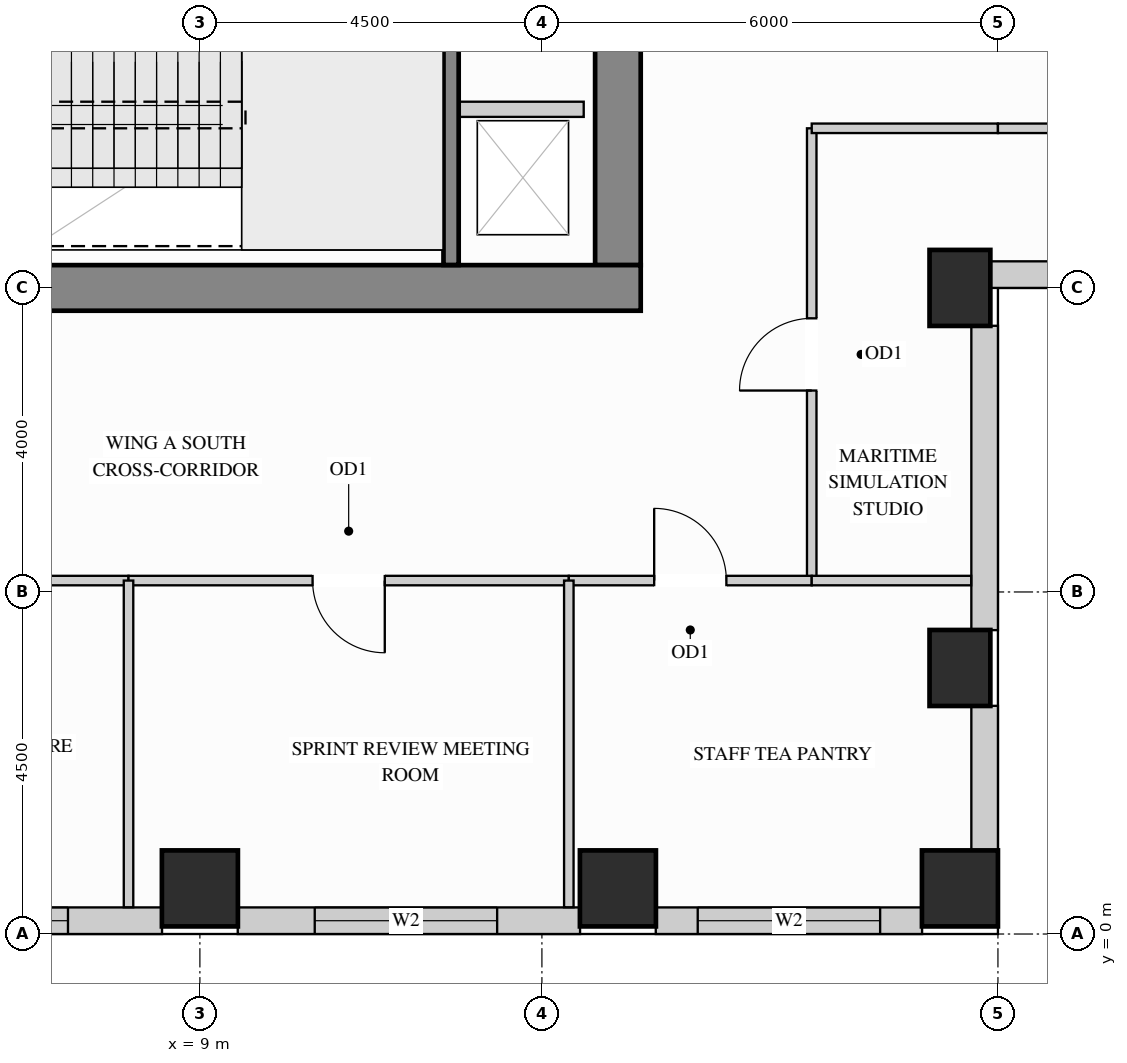
"""IFC4 building model, lengths in metres.
Left out: names, types, materials, properties, quantities, classifications, styles, units other than length and angle.
Written with IfcOpenShell. Run it as: python <this file> out.ifc"""

import sys

from ifc_helpers import new_model, si_unit, direction, frame, frame_2d, origin, origin_2d, place, context, subcontext, project, spatial, rectangle, extrude, source, transform, mapped, element, fill, save


model = new_model("IFC4")
c1 = context("Model", 3, precision=1e-05, world=origin(), true_north=direction((0.0, 1.0)))
c2 = subcontext(c1, "Body", "Model", "MODEL_VIEW")
j1 = project(units=[si_unit("LENGTHUNIT", "METRE"), si_unit("PLANEANGLEUNIT", "RADIAN")], contexts=[c1])
p1 = place(None, origin())
s1 = spatial("IfcSite", under=j1, at=p1, CompositionType="ELEMENT")
p2 = place(p1, origin())
s2 = spatial("IfcBuilding", under=s1, at=p2, CompositionType="ELEMENT")
p3 = place(p2, frame((0.0, 0.0, 193.5)))
s3 = spatial("IfcBuildingStorey", under=s2, at=p3, CompositionType="ELEMENT", Elevation=193.5)
m1 = source(origin(), c2, "Body", "SweptSolid", [
    extrude(rectangle(XDim=0.8, YDim=1.0, at=origin_2d()), origin(), (0.0, 0.0, 1.0), 3.4),
])
for number, where, z_axis, x_axis in (
    (1, (19.0, 3.5, 0.0), (0.0, 0.0, 1.0), (1.0, 0.0, 0.0)),
    (2, (19.0, 8.5, 0.0), (0.0, 0.0, 1.0), (1.0, 0.0, 0.0)),
):
    element("IfcColumn", number, at=place(p3, frame(where, z_axis=z_axis, x_axis=x_axis)), inside=s3, PredefinedType="COLUMN", context=c2, shape_type="MappedRepresentation", body=[
        mapped(m1, transform((0.0, 0.0, 0.0), x_axis=(1.0, 0.0, 0.0), y_axis=(0.0, 1.0, 0.0), z_axis=(0.0, 0.0, 1.0))),
    ])
m2 = source(origin(), c2, "Body", "SweptSolid", [
    extrude(rectangle(XDim=1.0, YDim=1.0, at=origin_2d()), origin(), (0.0, 0.0, 1.0), 3.4),
])
for number, where, z_axis, x_axis in (
    (3, (14.5, 0.6, 0.0), (0.0, 0.0, 1.0), (1.0, 0.0, 0.0)),
    (4, (19.0, 0.6, 0.0), (0.0, 0.0, 1.0), (1.0, 0.0, 0.0)),
    (5, (9.0, 0.6, 0.0), (0.0, 0.0, 1.0), (1.0, 0.0, 0.0)),
):
    element("IfcColumn", number, at=place(p3, frame(where, z_axis=z_axis, x_axis=x_axis)), inside=s3, PredefinedType="COLUMN", context=c2, shape_type="MappedRepresentation", body=[
        mapped(m2, transform((0.0, 0.0, 0.0), x_axis=(1.0, 0.0, 0.0), y_axis=(0.0, 1.0, 0.0), z_axis=(0.0, 0.0, 1.0))),
    ])
m3 = source(origin(), c2, "Body", "SweptSolid", [
    extrude(rectangle(XDim=10.02, YDim=0.6, at=frame_2d((5.01, 0.0))), origin(), (0.0, 0.0, 1.0), 3.4),
])
p4 = place(p3, frame((14.5, 8.8, 0.0), z_axis=(0.0, 0.0, 1.0), x_axis=(0.0, 1.0, 0.0)))
e6 = element("IfcWall", 6, at=p4, inside=s3, PredefinedType="SHEAR", context=c2, shape_type="MappedRepresentation", body=[
    mapped(m3, transform((0.0, 0.0, 0.0), x_axis=(1.0, 0.0, 0.0), y_axis=(0.0, 1.0, 0.0), z_axis=(0.0, 0.0, 1.0))),
])
m4 = source(origin(), c2, "Body", "SweptSolid", [
    extrude(rectangle(XDim=10.6, YDim=0.6, at=frame_2d((5.3, 0.0))), origin(), (0.0, 0.0, 1.0), 3.4),
])
p5 = place(p3, frame((4.2, 8.5, 0.0), z_axis=(0.0, 0.0, 1.0), x_axis=(1.0, 0.0, 0.0)))
e7 = element("IfcWall", 7, at=p5, inside=s3, PredefinedType="SHEAR", context=c2, shape_type="MappedRepresentation", body=[
    mapped(m4, transform((0.0, 0.0, 0.0), x_axis=(1.0, 0.0, 0.0), y_axis=(0.0, 1.0, 0.0), z_axis=(0.0, 0.0, 1.0))),
])
p6 = place(p3, frame((3.998, 0.175, 0.0), z_axis=(0.0, 0.0, 1.0), x_axis=(1.0, 0.0, 0.0)))
e8 = element("IfcWall", 8, at=p6, inside=s3, PredefinedType="SOLIDWALL", context=c2, shape_type="SweptSolid", body=[
    extrude(rectangle(XDim=4.504, YDim=0.35, at=frame_2d((2.252, 0.0))), origin(), (0.0, 0.0, 1.0), 2.612),
])
p7 = place(p6, frame((0.866, 0.0, 0.78)))
e9 = element("IfcOpeningElement", 9, at=p7, cuts=e8, PredefinedType="OPENING", context=c2, shape_type="SweptSolid", body=[
    extrude(rectangle(XDim=2.4, YDim=1.652, at=frame_2d((1.2, 0.826))), frame((0.0, 0.185, 0.0), z_axis=(0.0, -1.0, 0.0), x_axis=(1.0, 0.0, 0.0)), (0.0, 0.0, 1.0), 0.37),
])
p8 = place(p3, frame((9.498, 0.175, 0.0), z_axis=(0.0, 0.0, 1.0), x_axis=(1.0, 0.0, 0.0)))
e10 = element("IfcWall", 10, at=p8, inside=s3, PredefinedType="SOLIDWALL", context=c2, shape_type="SweptSolid", body=[
    extrude(rectangle(XDim=4.504, YDim=0.35, at=frame_2d((2.252, 0.0))), origin(), (0.0, 0.0, 1.0), 2.612),
])
p9 = place(p8, frame((1.013, 0.0, 0.78)))
e11 = element("IfcOpeningElement", 11, at=p9, cuts=e10, PredefinedType="OPENING", context=c2, shape_type="SweptSolid", body=[
    extrude(rectangle(XDim=2.4, YDim=1.652, at=frame_2d((1.2, 0.826))), frame((0.0, 0.185, 0.0), z_axis=(0.0, -1.0, 0.0), x_axis=(1.0, 0.0, 0.0)), (0.0, 0.0, 1.0), 0.37),
])
p10 = place(p3, frame((14.998, 0.175, 0.0), z_axis=(0.0, 0.0, 1.0), x_axis=(1.0, 0.0, 0.0)))
e12 = element("IfcWall", 12, at=p10, inside=s3, PredefinedType="SOLIDWALL", context=c2, shape_type="SweptSolid", body=[
    extrude(rectangle(XDim=3.504, YDim=0.35, at=frame_2d((1.752, 0.0))), origin(), (0.0, 0.0, 1.0), 2.612),
])
p11 = place(p10, frame((0.552, 0.0, 0.78)))
e13 = element("IfcOpeningElement", 13, at=p11, cuts=e12, PredefinedType="OPENING", context=c2, shape_type="SweptSolid", body=[
    extrude(rectangle(XDim=2.4, YDim=1.652, at=frame_2d((1.2, 0.826))), frame((0.0, 0.185, 0.0), z_axis=(0.0, -1.0, 0.0), x_axis=(1.0, 0.0, 0.0)), (0.0, 0.0, 1.0), 0.37),
])
m5 = source(origin(), c2, "Body", "SweptSolid", [
    extrude(rectangle(XDim=1.904, YDim=0.35, at=frame_2d((0.952, 0.0))), origin(), (0.0, 0.0, 1.0), 2.612),
])
p12 = place(p3, frame((19.325, 1.098, 0.0), z_axis=(0.0, 0.0, 1.0), x_axis=(0.0, 1.0, 0.0)))
e14 = element("IfcWall", 14, at=p12, inside=s3, PredefinedType="SOLIDWALL", context=c2, shape_type="MappedRepresentation", body=[
    mapped(m5, transform((0.0, 0.0, 0.0), x_axis=(1.0, 0.0, 0.0), y_axis=(0.0, 1.0, 0.0), z_axis=(0.0, 0.0, 1.0))),
])
m6 = source(origin(), c2, "Body", "SweptSolid", [
    extrude(rectangle(XDim=4.004, YDim=0.35, at=frame_2d((2.002, 0.0))), origin(), (0.0, 0.0, 1.0), 2.612),
])
p13 = place(p3, frame((19.325, 3.998, 0.0), z_axis=(0.0, 0.0, 1.0), x_axis=(0.0, 1.0, 0.0)))
e15 = element("IfcWall", 15, at=p13, inside=s3, PredefinedType="SOLIDWALL", context=c2, shape_type="MappedRepresentation", body=[
    mapped(m6, transform((0.0, 0.0, 0.0), x_axis=(1.0, 0.0, 0.0), y_axis=(0.0, 1.0, 0.0), z_axis=(0.0, 0.0, 1.0))),
])
p14 = place(p3, frame((19.398, 8.675, 0.0), z_axis=(0.0, 0.0, 1.0), x_axis=(1.0, 0.0, 0.0)))
e16 = element("IfcWall", 16, at=p14, inside=s3, PredefinedType="SOLIDWALL", context=c2, shape_type="SweptSolid", body=[
    extrude(rectangle(XDim=3.604, YDim=0.35, at=frame_2d((1.802, 0.0))), origin(), (0.0, 0.0, 1.0), 3.385),
])
p15 = place(p14, frame((1.067, 0.0, 0.78)))
e17 = element("IfcOpeningElement", 17, at=p15, cuts=e16, PredefinedType="OPENING", context=c2, shape_type="SweptSolid", body=[
    extrude(rectangle(XDim=1.5, YDim=2.0, at=frame_2d((0.75, 1.0))), frame((0.0, 0.185, 0.0), z_axis=(0.0, -1.0, 0.0), x_axis=(1.0, 0.0, 0.0)), (0.0, 0.0, 1.0), 0.37),
])
p16 = place(p3, frame((17.05, 4.65, 0.0), z_axis=(0.0, 0.0, 1.0), x_axis=(0.0, 1.0, 0.0)))
e18 = element("IfcWall", 18, at=p16, inside=s3, PredefinedType="PARTITIONING", context=c2, shape_type="SweptSolid", body=[
    extrude(rectangle(XDim=5.95, YDim=0.125, at=frame_2d((2.975, 0.0))), origin(), (0.0, 0.0, 1.0), 3.385),
])
p17 = place(p16, frame((2.5, 0.0, 0.0)))
e19 = element("IfcOpeningElement", 19, at=p17, cuts=e18, PredefinedType="OPENING", context=c2, shape_type="SweptSolid", body=[
    extrude(rectangle(XDim=0.95, YDim=2.15, at=frame_2d((0.475, 1.075))), frame((0.0, 0.073, 0.0), z_axis=(0.0, -1.0, 0.0), x_axis=(1.0, 0.0, 0.0)), (0.0, 0.0, 1.0), 0.145),
])
m7 = source(origin(), c2, "Body", "SweptSolid", [
    extrude(rectangle(XDim=2.45, YDim=0.125, at=frame_2d((1.225, 0.0))), origin(), (0.0, 0.0, 1.0), 3.385),
])
p18 = place(p3, frame((17.05, 10.6, 0.0), z_axis=(0.0, 0.0, 1.0), x_axis=(1.0, 0.0, 0.0)))
e20 = element("IfcWall", 20, at=p18, inside=s3, PredefinedType="PARTITIONING", context=c2, shape_type="MappedRepresentation", body=[
    mapped(m7, transform((0.0, 0.0, 0.0), x_axis=(1.0, 0.0, 0.0), y_axis=(0.0, 1.0, 0.0), z_axis=(0.0, 0.0, 1.0))),
])
p19 = place(p3, frame((19.5, 10.6, 0.0), z_axis=(0.0, 0.0, 1.0), x_axis=(1.0, 0.0, 0.0)))
e21 = element("IfcWall", 21, at=p19, inside=s3, PredefinedType="PARTITIONING", context=c2, shape_type="SweptSolid", body=[
    extrude(rectangle(XDim=14.9, YDim=0.125, at=frame_2d((7.45, 0.0))), origin(), (0.0, 0.0, 1.0), 3.385),
])
p20 = place(p19, frame((6.975, 0.0, 0.0)))
e22 = element("IfcOpeningElement", 22, at=p20, cuts=e21, PredefinedType="OPENING", context=c2, shape_type="SweptSolid", body=[
    extrude(rectangle(XDim=0.95, YDim=2.15, at=frame_2d((0.475, 1.075))), frame((0.0, 0.073, 0.0), z_axis=(0.0, -1.0, 0.0), x_axis=(1.0, 0.0, 0.0)), (0.0, 0.0, 1.0), 0.145),
])
p21 = place(p3, frame((2.45, 4.65, 0.0), z_axis=(0.0, 0.0, 1.0), x_axis=(1.0, 0.0, 0.0)))
e23 = element("IfcWall", 23, at=p21, inside=s3, PredefinedType="PARTITIONING", context=c2, shape_type="SweptSolid", body=[
    extrude(rectangle(XDim=5.611, YDim=0.125, at=frame_2d((2.806, 0.0))), origin(), (0.0, 0.0, 1.0), 2.848),
])
p22 = place(p21, frame((2.331, 0.0, 0.0)))
e24 = element("IfcOpeningElement", 24, at=p22, cuts=e23, PredefinedType="OPENING", context=c2, shape_type="SweptSolid", body=[
    extrude(rectangle(XDim=0.95, YDim=2.15, at=frame_2d((0.475, 1.075))), frame((0.0, 0.073, 0.0), z_axis=(0.0, -1.0, 0.0), x_axis=(1.0, 0.0, 0.0)), (0.0, 0.0, 1.0), 0.145),
])
p23 = place(p3, frame((8.061, 4.65, 0.0), z_axis=(0.0, 0.0, 1.0), x_axis=(1.0, 0.0, 0.0)))
e25 = element("IfcWall", 25, at=p23, inside=s3, PredefinedType="PARTITIONING", context=c2, shape_type="SweptSolid", body=[
    extrude(rectangle(XDim=5.793, YDim=0.125, at=frame_2d((2.896, 0.0))), origin(), (0.0, 0.0, 1.0), 2.848),
])
p24 = place(p23, frame((2.421, 0.0, 0.0)))
e26 = element("IfcOpeningElement", 26, at=p24, cuts=e25, PredefinedType="OPENING", context=c2, shape_type="SweptSolid", body=[
    extrude(rectangle(XDim=0.95, YDim=2.15, at=frame_2d((0.475, 1.075))), frame((0.0, 0.073, 0.0), z_axis=(0.0, -1.0, 0.0), x_axis=(1.0, 0.0, 0.0)), (0.0, 0.0, 1.0), 0.145),
])
p25 = place(p3, frame((13.854, 4.65, 0.0), z_axis=(0.0, 0.0, 1.0), x_axis=(1.0, 0.0, 0.0)))
e27 = element("IfcWall", 27, at=p25, inside=s3, PredefinedType="PARTITIONING", context=c2, shape_type="SweptSolid", body=[
    extrude(rectangle(XDim=3.196, YDim=0.125, at=frame_2d((1.598, 0.0))), origin(), (0.0, 0.0, 1.0), 2.848),
])
p26 = place(p25, frame((1.123, 0.0, 0.0)))
e28 = element("IfcOpeningElement", 28, at=p26, cuts=e27, PredefinedType="OPENING", context=c2, shape_type="SweptSolid", body=[
    extrude(rectangle(XDim=0.95, YDim=2.15, at=frame_2d((0.475, 1.075))), frame((0.0, 0.073, 0.0), z_axis=(0.0, -1.0, 0.0), x_axis=(1.0, 0.0, 0.0)), (0.0, 0.0, 1.0), 0.145),
])
m8 = source(origin(), c2, "Body", "SweptSolid", [
    extrude(rectangle(XDim=2.098, YDim=0.125, at=frame_2d((1.049, 0.0))), origin(), (0.0, 0.0, 1.0), 2.848),
])
p27 = place(p3, frame((17.05, 4.65, 0.0), z_axis=(0.0, 0.0, 1.0), x_axis=(1.0, 0.0, 0.0)))
e29 = element("IfcWall", 29, at=p27, inside=s3, PredefinedType="PARTITIONING", context=c2, shape_type="MappedRepresentation", body=[
    mapped(m8, transform((0.0, 0.0, 0.0), x_axis=(1.0, 0.0, 0.0), y_axis=(0.0, 1.0, 0.0), z_axis=(0.0, 0.0, 1.0))),
])
m9 = source(origin(), c2, "Body", "SweptSolid", [
    extrude(rectangle(XDim=4.298, YDim=0.125, at=frame_2d((2.149, 0.0))), origin(), (0.0, 0.0, 1.0), 3.385),
])
for number, where, z_axis, x_axis in (
    (30, (8.061, 0.352, 0.0), (0.0, 0.0, 1.0), (0.0, 1.0, 0.0)),
    (31, (13.854, 0.352, 0.0), (0.0, 0.0, 1.0), (0.0, 1.0, 0.0)),
):
    element("IfcWall", number, at=place(p3, frame(where, z_axis=z_axis, x_axis=x_axis)), inside=s3, PredefinedType="PARTITIONING", context=c2, shape_type="MappedRepresentation", body=[
        mapped(m9, transform((0.0, 0.0, 0.0), x_axis=(1.0, 0.0, 0.0), y_axis=(0.0, 1.0, 0.0), z_axis=(0.0, 0.0, 1.0))),
    ])
m10 = source(origin(), c2, "Body", "SweptSolid", [
    extrude(rectangle(XDim=1.63, YDim=0.2, at=frame_2d((0.815, 0.0))), origin(), (0.0, 0.0, 1.0), 3.385),
])
p28 = place(p3, frame((12.42, 10.85, 0.0), z_axis=(0.0, 0.0, 1.0), x_axis=(1.0, 0.0, 0.0)))
e32 = element("IfcWall", 32, at=p28, inside=s3, PredefinedType="PARTITIONING", context=c2, shape_type="MappedRepresentation", body=[
    mapped(m10, transform((0.0, 0.0, 0.0), x_axis=(1.0, 0.0, 0.0), y_axis=(0.0, 1.0, 0.0), z_axis=(0.0, 0.0, 1.0))),
])
m11 = source(origin(), c2, "Body", "SweptSolid", [
    extrude(rectangle(XDim=3.753, YDim=0.2, at=frame_2d((1.876, 0.0))), origin(), (0.0, 0.0, 1.0), 3.4),
])
p29 = place(p3, frame((12.305, 8.802, 0.0), z_axis=(0.0, 0.0, 1.0), x_axis=(0.0, 1.0, 0.0)))
e33 = element("IfcWall", 33, at=p29, inside=s3, PredefinedType="SHEAR", context=c2, shape_type="MappedRepresentation", body=[
    mapped(m11, transform((0.0, 0.0, 0.0), x_axis=(1.0, 0.0, 0.0), y_axis=(0.0, 1.0, 0.0), z_axis=(0.0, 0.0, 1.0))),
])
m12 = source(origin(), c2, "Body", "SweptSolid", [
    extrude(rectangle(XDim=0.95, YDim=2.15, at=frame_2d((0.475, 1.075))), frame((0.0, 0.025, 0.0), z_axis=(0.0, -1.0, 0.0), x_axis=(1.0, 0.0, 0.0)), (0.0, 0.0, 1.0), 0.05),
])
p30 = place(p17, origin())
e34 = element("IfcDoor", 34, at=p30, inside=s3, OperationType="SINGLE_SWING_LEFT", PredefinedType="DOOR", context=c2, shape_type="MappedRepresentation", body=[
    mapped(m12, transform((0.0, 0.0, 0.0), x_axis=(1.0, 0.0, 0.0), y_axis=(0.0, 1.0, 0.0), z_axis=(0.0, 0.0, 1.0))),
])
fill(e19, e34)
p31 = place(p24, origin())
e35 = element("IfcDoor", 35, at=p31, inside=s3, OperationType="SINGLE_SWING_RIGHT", PredefinedType="DOOR", context=c2, shape_type="MappedRepresentation", body=[
    mapped(m12, transform((0.0, 0.0, 0.0), x_axis=(1.0, 0.0, 0.0), y_axis=(0.0, 1.0, 0.0), z_axis=(0.0, 0.0, 1.0))),
])
fill(e26, e35)
p32 = place(p26, origin())
e36 = element("IfcDoor", 36, at=p32, inside=s3, OperationType="SINGLE_SWING_LEFT", PredefinedType="DOOR", context=c2, shape_type="MappedRepresentation", body=[
    mapped(m12, transform((0.0, 0.0, 0.0), x_axis=(1.0, 0.0, 0.0), y_axis=(0.0, 1.0, 0.0), z_axis=(0.0, 0.0, 1.0))),
])
fill(e28, e36)
m13 = source(origin(), c2, "Body", "SweptSolid", [
    extrude(rectangle(XDim=2.4, YDim=1.652, at=frame_2d((1.2, 0.826))), frame((0.0, 0.03, 0.0), z_axis=(0.0, -1.0, 0.0), x_axis=(1.0, 0.0, 0.0)), (0.0, 0.0, 1.0), 0.06),
])
p33 = place(p7, origin())
e37 = element("IfcWindow", 37, at=p33, inside=s3, PartitioningType="SINGLE_PANEL", PredefinedType="WINDOW", context=c2, shape_type="MappedRepresentation", body=[
    mapped(m13, transform((0.0, 0.0, 0.0), x_axis=(1.0, 0.0, 0.0), y_axis=(0.0, 1.0, 0.0), z_axis=(0.0, 0.0, 1.0))),
])
fill(e9, e37)
p34 = place(p9, origin())
e38 = element("IfcWindow", 38, at=p34, inside=s3, PartitioningType="SINGLE_PANEL", PredefinedType="WINDOW", context=c2, shape_type="MappedRepresentation", body=[
    mapped(m13, transform((0.0, 0.0, 0.0), x_axis=(1.0, 0.0, 0.0), y_axis=(0.0, 1.0, 0.0), z_axis=(0.0, 0.0, 1.0))),
])
fill(e11, e38)
p35 = place(p11, origin())
e39 = element("IfcWindow", 39, at=p35, inside=s3, PartitioningType="SINGLE_PANEL", PredefinedType="WINDOW", context=c2, shape_type="MappedRepresentation", body=[
    mapped(m13, transform((0.0, 0.0, 0.0), x_axis=(1.0, 0.0, 0.0), y_axis=(0.0, 1.0, 0.0), z_axis=(0.0, 0.0, 1.0))),
])
fill(e13, e39)
save(model, sys.argv[1])
